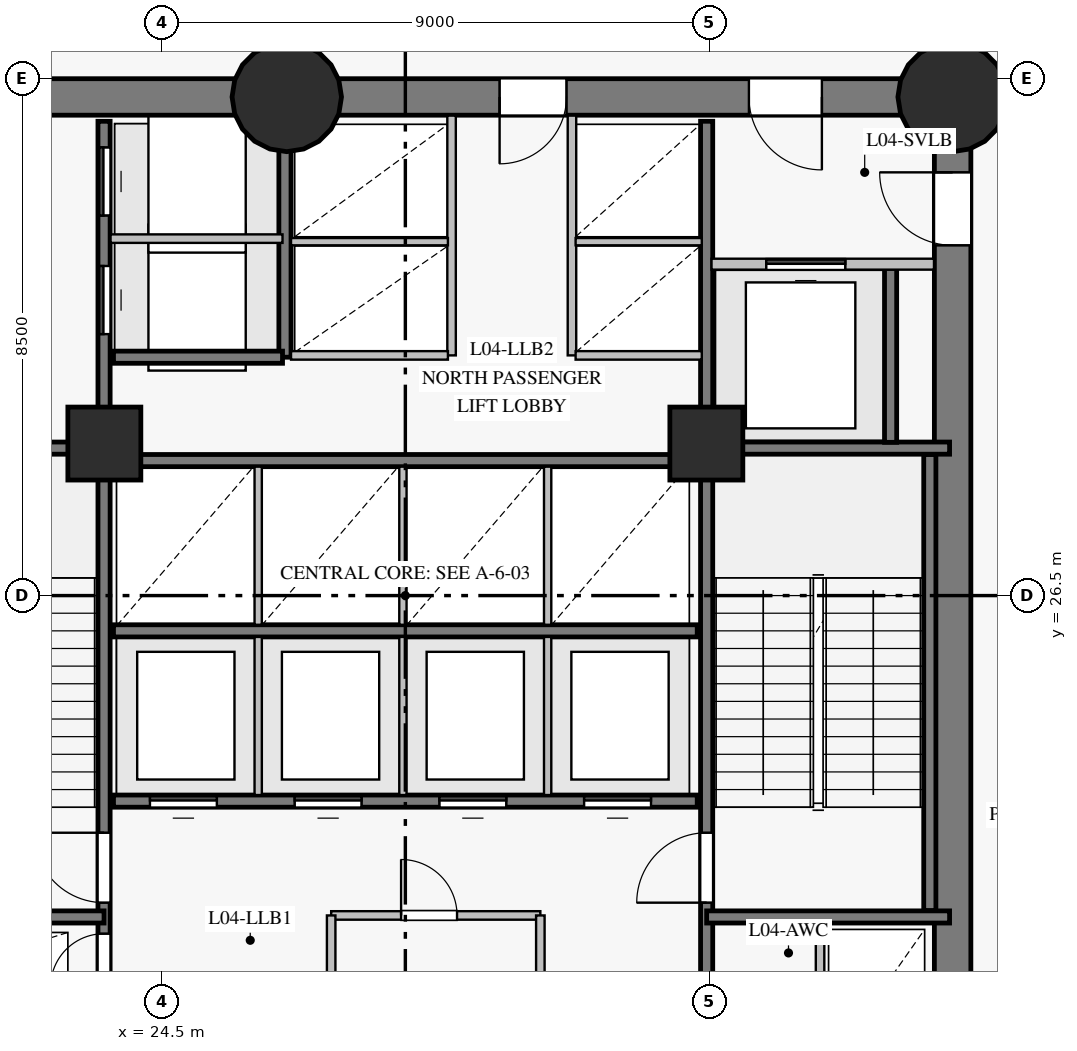
"""IFC4 building model, lengths in metres.
Left out: names, types, materials, properties, quantities, classifications, styles, units other than length and angle.
Written with IfcOpenShell. Run it as: python <this file> out.ifc"""

import sys

from ifc_helpers import new_model, si_unit, direction, frame, frame_2d, origin, origin_with_axes, origin_2d, place, context, subcontext, project, spatial, rectangle, circle, extrude, source, transform, mapped, element, fill, save


model = new_model("IFC4")
c1 = context("Model", 3, precision=1e-05, world=origin(), true_north=direction((0.0, 1.0)))
c2 = subcontext(c1, "Body", "Model", "MODEL_VIEW")
j1 = project(units=[si_unit("LENGTHUNIT", "METRE"), si_unit("PLANEANGLEUNIT", "RADIAN")], contexts=[c1])
p1 = place(None, origin())
s1 = spatial("IfcSite", under=j1, at=p1, CompositionType="ELEMENT")
p2 = place(p1, origin())
s2 = spatial("IfcBuilding", under=s1, at=p2, CompositionType="ELEMENT")
p3 = place(p2, frame((0.0, 0.0, 18.0)))
s3 = spatial("IfcBuildingStorey", under=s2, at=p3, CompositionType="ELEMENT", Elevation=18.0)
p4 = place(p3, frame((37.5, 18.3, 0.0), z_axis=(0.0, 0.0, 1.0), x_axis=(0.0, 1.0, 0.0)))
e1 = element("IfcWall", 1, at=p4, inside=s3, PredefinedType="SHEAR", context=c2, shape_type="SweptSolid", body=[
    extrude(rectangle(XDim=16.4, YDim=0.6, at=frame_2d((8.2, 0.0))), origin(), (0.0, 0.0, 1.0), 4.225),
])
p5 = place(p4, frame((13.96, 0.0, 0.0)))
e2 = element("IfcOpeningElement", 2, at=p5, cuts=e1, PredefinedType="OPENING", context=c2, shape_type="SweptSolid", body=[
    extrude(rectangle(XDim=1.2, YDim=2.15, at=frame_2d((0.6, 1.075))), frame((0.0, 0.31, 0.0), z_axis=(0.0, -1.0, 0.0), x_axis=(1.0, 0.0, 0.0)), (0.0, 0.0, 1.0), 0.62),
])
p6 = place(p3, frame((37.5, 34.7, 0.0), z_axis=(0.0, 0.0, 1.0), x_axis=(-1.0, 0.0, 0.0)))
e3 = element("IfcWall", 3, at=p6, inside=s3, PredefinedType="SHEAR", context=c2, shape_type="SweptSolid", body=[
    extrude(rectangle(XDim=10.95, YDim=0.6, at=frame_2d((5.475, 0.0))), origin(), (0.0, 0.0, 1.0), 4.225),
])
p7 = place(p6, frame((2.15, 0.0, 0.0)))
e4 = element("IfcOpeningElement", 4, at=p7, cuts=e3, PredefinedType="OPENING", context=c2, shape_type="SweptSolid", body=[
    extrude(rectangle(XDim=1.2, YDim=2.15, at=frame_2d((0.6, 1.075))), frame((0.0, 0.31, 0.0), z_axis=(0.0, -1.0, 0.0), x_axis=(1.0, 0.0, 0.0)), (0.0, 0.0, 1.0), 0.62),
])
p8 = place(p6, frame((6.35, 0.0, 0.0)))
e5 = element("IfcOpeningElement", 5, at=p8, cuts=e3, PredefinedType="OPENING", context=c2, shape_type="SweptSolid", body=[
    extrude(rectangle(XDim=1.1, YDim=2.15, at=frame_2d((0.55, 1.075))), frame((0.0, 0.31, 0.0), z_axis=(0.0, -1.0, 0.0), x_axis=(1.0, 0.0, 0.0)), (0.0, 0.0, 1.0), 0.62),
])
p9 = place(p3, frame((26.55, 34.7, 0.0), z_axis=(0.0, 0.0, 1.0), x_axis=(-1.0, 0.0, 0.0)))
e6 = element("IfcWall", 6, at=p9, inside=s3, PredefinedType="SHEAR", context=c2, shape_type="SweptSolid", body=[
    extrude(rectangle(XDim=7.05, YDim=0.6, at=frame_2d((3.525, 0.0))), origin(), (0.0, 0.0, 1.0), 4.225),
])
p10 = place(p9, frame((4.25, 0.0, 0.0)))
e7 = element("IfcOpeningElement", 7, at=p10, cuts=e6, PredefinedType="OPENING", context=c2, shape_type="SweptSolid", body=[
    extrude(rectangle(XDim=1.1, YDim=2.15, at=frame_2d((0.55, 1.075))), frame((0.0, 0.31, 0.0), z_axis=(0.0, -1.0, 0.0), x_axis=(1.0, 0.0, 0.0)), (0.0, 0.0, 1.0), 0.62),
])
m1 = source(origin_with_axes(), c2, "Body", "SweptSolid", [
    extrude(circle(Radius=0.9, at=origin_2d()), origin(), (0.0, 0.0, 1.0), 4.5),
])
for number, where, z_axis, x_axis in (
    (8, (26.55, 34.7, 0.0), (0.0, 0.0, 1.0), (1.0, 0.0, 0.0)),
    (9, (37.5, 34.7, 0.0), (0.0, 0.0, 1.0), (1.0, 0.0, 0.0)),
):
    element("IfcColumn", number, at=place(p3, frame(where, z_axis=z_axis, x_axis=x_axis)), inside=s3, PredefinedType="COLUMN", context=c2, shape_type="MappedRepresentation", body=[
        mapped(m1, transform((0.0, 0.0, 0.0), scale=1.0)),
    ])
m2 = source(origin_with_axes(), c2, "Body", "SweptSolid", [
    extrude(rectangle(XDim=1.2, YDim=1.2, at=origin_2d()), origin(), (0.0, 0.0, 1.0), 4.5),
])
for number, where, z_axis, x_axis in (
    (10, (23.55, 29.0, 0.0), (0.0, 0.0, 1.0), (1.0, 0.0, 0.0)),
    (11, (33.45, 29.0, 0.0), (0.0, 0.0, 1.0), (1.0, 0.0, 0.0)),
):
    element("IfcColumn", number, at=place(p3, frame(where, z_axis=z_axis, x_axis=x_axis)), inside=s3, PredefinedType="COLUMN", context=c2, shape_type="MappedRepresentation", body=[
        mapped(m2, transform((0.0, 0.0, 0.0), scale=1.0)),
    ])
p11 = place(p3, frame((23.545, 18.7, 0.0), z_axis=(0.0, 0.0, 1.0), x_axis=(0.0, 1.0, 0.0)))
e12 = element("IfcWall", 12, at=p11, inside=s3, PredefinedType="SHEAR", context=c2, shape_type="SweptSolid", body=[
    extrude(rectangle(XDim=15.6, YDim=0.2, at=frame_2d((7.8, 0.0))), origin(), (0.0, 0.0, 1.0), 4.225),
])
p12 = place(p11, frame((2.75, 0.0, 0.0)))
e13 = element("IfcOpeningElement", 13, at=p12, cuts=e12, PredefinedType="OPENING", context=c2, shape_type="SweptSolid", body=[
    extrude(rectangle(XDim=1.15, YDim=2.15, at=frame_2d((0.575, 1.075))), frame((0.0, 0.11, 0.0), z_axis=(0.0, -1.0, 0.0), x_axis=(1.0, 0.0, 0.0)), (0.0, 0.0, 1.0), 0.22),
])
p13 = place(p11, frame((0.14, 0.0, 0.0)))
e14 = element("IfcOpeningElement", 14, at=p13, cuts=e12, PredefinedType="OPENING", context=c2, shape_type="SweptSolid", body=[
    extrude(rectangle(XDim=0.88, YDim=2.1, at=frame_2d((0.44, 1.05))), frame((0.0, 0.11, 0.0), z_axis=(0.0, -1.0, 0.0), x_axis=(1.0, 0.0, 0.0)), (0.0, 0.0, 1.0), 0.22),
])
p14 = place(p11, frame((1.36, 0.0, 0.0)))
e15 = element("IfcOpeningElement", 15, at=p14, cuts=e12, PredefinedType="OPENING", context=c2, shape_type="SweptSolid", body=[
    extrude(rectangle(XDim=0.88, YDim=2.1, at=frame_2d((0.44, 1.05))), frame((0.0, 0.11, 0.0), z_axis=(0.0, -1.0, 0.0), x_axis=(1.0, 0.0, 0.0)), (0.0, 0.0, 1.0), 0.22),
])
p15 = place(p11, frame((12.1, 0.0, 0.0)))
e16 = element("IfcOpeningElement", 16, at=p15, cuts=e12, PredefinedType="OPENING", context=c2, shape_type="SweptSolid", body=[
    extrude(rectangle(XDim=1.12, YDim=2.15, at=frame_2d((0.56, 1.075))), frame((0.0, 0.11, 0.0), z_axis=(0.0, -1.0, 0.0), x_axis=(1.0, 0.0, 0.0)), (0.0, 0.0, 1.0), 0.22),
])
p16 = place(p11, frame((14.05, 0.0, 0.0)))
e17 = element("IfcOpeningElement", 17, at=p16, cuts=e12, PredefinedType="OPENING", context=c2, shape_type="SweptSolid", body=[
    extrude(rectangle(XDim=1.12, YDim=2.15, at=frame_2d((0.56, 1.075))), frame((0.0, 0.11, 0.0), z_axis=(0.0, -1.0, 0.0), x_axis=(1.0, 0.0, 0.0)), (0.0, 0.0, 1.0), 0.22),
])
p17 = place(p3, frame((33.455, 18.7, 0.0), z_axis=(0.0, 0.0, 1.0), x_axis=(0.0, 1.0, 0.0)))
e18 = element("IfcWall", 18, at=p17, inside=s3, PredefinedType="SHEAR", context=c2, shape_type="SweptSolid", body=[
    extrude(rectangle(XDim=15.6, YDim=0.2, at=frame_2d((7.8, 0.0))), origin(), (0.0, 0.0, 1.0), 4.225),
])
p18 = place(p17, frame((2.75, 0.0, 0.0)))
e19 = element("IfcOpeningElement", 19, at=p18, cuts=e18, PredefinedType="OPENING", context=c2, shape_type="SweptSolid", body=[
    extrude(rectangle(XDim=1.15, YDim=2.15, at=frame_2d((0.575, 1.075))), frame((0.0, 0.11, 0.0), z_axis=(0.0, -1.0, 0.0), x_axis=(1.0, 0.0, 0.0)), (0.0, 0.0, 1.0), 0.22),
])
p19 = place(p17, frame((0.55, 0.0, 0.0)))
e20 = element("IfcOpeningElement", 20, at=p19, cuts=e18, PredefinedType="OPENING", context=c2, shape_type="SweptSolid", body=[
    extrude(rectangle(XDim=0.94, YDim=2.1, at=frame_2d((0.47, 1.05))), frame((0.0, 0.11, 0.0), z_axis=(0.0, -1.0, 0.0), x_axis=(1.0, 0.0, 0.0)), (0.0, 0.0, 1.0), 0.22),
])
p20 = place(p3, frame((23.7, 23.12, 0.0), z_axis=(0.0, 0.0, 1.0), x_axis=(1.0, 0.0, 0.0)))
e21 = element("IfcWall", 21, at=p20, inside=s3, PredefinedType="SHEAR", context=c2, shape_type="SweptSolid", body=[
    extrude(rectangle(XDim=9.6, YDim=0.2, at=frame_2d((4.8, 0.0))), origin(), (0.0, 0.0, 1.0), 4.225),
])
p21 = place(p20, frame((0.6, 0.0, 0.0)))
e22 = element("IfcOpeningElement", 22, at=p21, cuts=e21, PredefinedType="OPENING", context=c2, shape_type="SweptSolid", body=[
    extrude(rectangle(XDim=1.1, YDim=2.15, at=frame_2d((0.55, 1.075))), frame((0.0, 0.11, 0.0), z_axis=(0.0, -1.0, 0.0), x_axis=(1.0, 0.0, 0.0)), (0.0, 0.0, 1.0), 0.22),
])
p22 = place(p20, frame((2.98, 0.0, 0.0)))
e23 = element("IfcOpeningElement", 23, at=p22, cuts=e21, PredefinedType="OPENING", context=c2, shape_type="SweptSolid", body=[
    extrude(rectangle(XDim=1.1, YDim=2.15, at=frame_2d((0.55, 1.075))), frame((0.0, 0.11, 0.0), z_axis=(0.0, -1.0, 0.0), x_axis=(1.0, 0.0, 0.0)), (0.0, 0.0, 1.0), 0.22),
])
p23 = place(p20, frame((5.36, 0.0, 0.0)))
e24 = element("IfcOpeningElement", 24, at=p23, cuts=e21, PredefinedType="OPENING", context=c2, shape_type="SweptSolid", body=[
    extrude(rectangle(XDim=1.1, YDim=2.15, at=frame_2d((0.55, 1.075))), frame((0.0, 0.11, 0.0), z_axis=(0.0, -1.0, 0.0), x_axis=(1.0, 0.0, 0.0)), (0.0, 0.0, 1.0), 0.22),
])
p24 = place(p20, frame((7.74, 0.0, 0.0)))
e25 = element("IfcOpeningElement", 25, at=p24, cuts=e21, PredefinedType="OPENING", context=c2, shape_type="SweptSolid", body=[
    extrude(rectangle(XDim=1.1, YDim=2.15, at=frame_2d((0.55, 1.075))), frame((0.0, 0.11, 0.0), z_axis=(0.0, -1.0, 0.0), x_axis=(1.0, 0.0, 0.0)), (0.0, 0.0, 1.0), 0.22),
])
for number, where, z_axis, x_axis in (
    (26, (23.7, 25.92, 0.0), (0.0, 0.0, 1.0), (1.0, 0.0, 0.0)),
    (27, (23.7, 28.72, 0.0), (0.0, 0.0, 1.0), (1.0, 0.0, 0.0)),
):
    element("IfcWall", number, at=place(p3, frame(where, z_axis=z_axis, x_axis=x_axis)), inside=s3, PredefinedType="SHEAR", context=c2, shape_type="SweptSolid", body=[
        extrude(rectangle(XDim=9.6, YDim=0.2, at=frame_2d((4.8, 0.0))), origin(), (0.0, 0.0, 1.0), 4.225),
    ])
p25 = place(p3, frame((37.125, 21.32, 0.0), z_axis=(0.0, 0.0, 1.0), x_axis=(0.0, 1.0, 0.0)))
e28 = element("IfcWall", 28, at=p25, inside=s3, PredefinedType="SHEAR", context=c2, shape_type="SweptSolid", body=[
    extrude(rectangle(XDim=7.5, YDim=0.2, at=frame_2d((3.75, 0.0))), origin(), (0.0, 0.0, 1.0), 4.225),
])
for number, where, z_axis, x_axis in (
    (29, (33.455, 21.215, 0.0), (0.0, 0.0, 1.0), (1.0, 0.0, 0.0)),
    (30, (33.455, 28.925, 0.0), (0.0, 0.0, 1.0), (1.0, 0.0, 0.0)),
    (31, (19.55, 21.215, 0.0), (0.0, 0.0, 1.0), (1.0, 0.0, 0.0)),
    (32, (19.55, 28.925, 0.0), (0.0, 0.0, 1.0), (1.0, 0.0, 0.0)),
):
    element("IfcWall", number, at=place(p3, frame(where, z_axis=z_axis, x_axis=x_axis)), inside=s3, PredefinedType="SHEAR", context=c2, shape_type="SweptSolid", body=[
        extrude(rectangle(XDim=3.995, YDim=0.2, at=frame_2d((1.998, 0.0))), origin(), (0.0, 0.0, 1.0), 4.225),
    ])
p26 = place(p3, frame((26.52, 30.42, 0.0), z_axis=(0.0, 0.0, 1.0), x_axis=(0.0, 1.0, 0.0)))
e33 = element("IfcWall", 33, at=p26, inside=s3, PredefinedType="SHEAR", context=c2, shape_type="SweptSolid", body=[
    extrude(rectangle(XDim=3.86, YDim=0.2, at=frame_2d((1.93, 0.0))), origin(), (0.0, 0.0, 1.0), 4.225),
])
p27 = place(p3, frame((36.48, 29.02, 0.0), z_axis=(0.0, 0.0, 1.0), x_axis=(0.0, 1.0, 0.0)))
e34 = element("IfcWall", 34, at=p27, inside=s3, PredefinedType="SHEAR", context=c2, shape_type="SweptSolid", body=[
    extrude(rectangle(XDim=2.86, YDim=0.2, at=frame_2d((1.43, 0.0))), origin(), (0.0, 0.0, 1.0), 4.225),
])
p28 = place(p3, frame((23.7, 30.42, 0.0), z_axis=(0.0, 0.0, 1.0), x_axis=(1.0, 0.0, 0.0)))
e35 = element("IfcWall", 35, at=p28, inside=s3, PredefinedType="SHEAR", context=c2, shape_type="SweptSolid", body=[
    extrude(rectangle(XDim=2.78, YDim=0.2, at=frame_2d((1.39, 0.0))), origin(), (0.0, 0.0, 1.0), 4.225),
])
for number, where, z_axis, x_axis in (
    (36, (29.26, 30.45, 0.0), (0.0, 0.0, 1.0), (0.0, 1.0, 0.0)),
    (37, (31.24, 30.45, 0.0), (0.0, 0.0, 1.0), (0.0, 1.0, 0.0)),
):
    element("IfcWall", number, at=place(p3, frame(where, z_axis=z_axis, x_axis=x_axis)), inside=s3, PredefinedType="PARTITIONING", context=c2, shape_type="SweptSolid", body=[
        extrude(rectangle(XDim=3.943, YDim=0.14, at=frame_2d((1.972, 0.0))), origin(), (0.0, 0.0, 1.0), 4.225),
    ])
p29 = place(p3, frame((33.535, 31.95, 0.0), z_axis=(0.0, 0.0, 1.0), x_axis=(1.0, 0.0, 0.0)))
e38 = element("IfcWall", 38, at=p29, inside=s3, PredefinedType="PARTITIONING", context=c2, shape_type="SweptSolid", body=[
    extrude(rectangle(XDim=3.658, YDim=0.18, at=frame_2d((1.829, 0.0))), origin(), (0.0, 0.0, 1.0), 4.225),
])
p30 = place(p29, frame((0.9, 0.0, 0.0)))
e39 = element("IfcOpeningElement", 39, at=p30, cuts=e38, PredefinedType="OPENING", context=c2, shape_type="SweptSolid", body=[
    extrude(rectangle(XDim=1.3, YDim=2.2, at=frame_2d((0.65, 1.1))), frame((0.0, 0.1, 0.0), z_axis=(0.0, -1.0, 0.0), x_axis=(1.0, 0.0, 0.0)), (0.0, 0.0, 1.0), 0.2),
])
p31 = place(p3, frame((27.28, 21.24, 0.0), z_axis=(0.0, 0.0, 1.0), x_axis=(1.0, 0.0, 0.0)))
e40 = element("IfcWall", 40, at=p31, inside=s3, PredefinedType="PARTITIONING", context=c2, shape_type="SweptSolid", body=[
    extrude(rectangle(XDim=3.44, YDim=0.14, at=frame_2d((1.72, 0.0))), origin(), (0.0, 0.0, 1.0), 4.225),
])
p32 = place(p31, frame((1.15, 0.0, 0.0)))
e41 = element("IfcOpeningElement", 41, at=p32, cuts=e40, PredefinedType="OPENING", context=c2, shape_type="SweptSolid", body=[
    extrude(rectangle(XDim=0.92, YDim=2.1, at=frame_2d((0.46, 1.05))), frame((0.0, 0.08, 0.0), z_axis=(0.0, -1.0, 0.0), x_axis=(1.0, 0.0, 0.0)), (0.0, 0.0, 1.0), 0.16),
])
p33 = place(p3, frame((23.652, 32.37, 0.0), z_axis=(0.0, 0.0, 1.0), x_axis=(1.0, 0.0, 0.0)))
e42 = element("IfcWall", 42, at=p33, inside=s3, PredefinedType="PARTITIONING", context=c2, shape_type="SweptSolid", body=[
    extrude(rectangle(XDim=2.828, YDim=0.14, at=frame_2d((1.414, 0.0))), origin(), (0.0, 0.0, 1.0), 4.225),
])
for number, where, z_axis, x_axis in (
    (43, (27.28, 18.55, 0.0), (0.0, 0.0, 1.0), (0.0, 1.0, 0.0)),
    (44, (30.72, 18.55, 0.0), (0.0, 0.0, 1.0), (0.0, 1.0, 0.0)),
):
    element("IfcWall", number, at=place(p3, frame(where, z_axis=z_axis, x_axis=x_axis)), inside=s3, PredefinedType="PARTITIONING", context=c2, shape_type="SweptSolid", body=[
        extrude(rectangle(XDim=2.69, YDim=0.14, at=frame_2d((1.345, 0.0))), origin(), (0.0, 0.0, 1.0), 4.225),
    ])
for number, where, z_axis, x_axis in (
    (45, (26.08, 23.22, 0.0), (0.0, 0.0, 1.0), (0.0, 1.0, 0.0)),
    (46, (28.46, 23.22, 0.0), (0.0, 0.0, 1.0), (0.0, 1.0, 0.0)),
    (47, (30.84, 23.22, 0.0), (0.0, 0.0, 1.0), (0.0, 1.0, 0.0)),
    (48, (26.08, 26.02, 0.0), (0.0, 0.0, 1.0), (0.0, 1.0, 0.0)),
    (49, (28.46, 26.02, 0.0), (0.0, 0.0, 1.0), (0.0, 1.0, 0.0)),
    (50, (30.84, 26.02, 0.0), (0.0, 0.0, 1.0), (0.0, 1.0, 0.0)),
):
    element("IfcWall", number, at=place(p3, frame(where, z_axis=z_axis, x_axis=x_axis)), inside=s3, PredefinedType="PARTITIONING", context=c2, shape_type="SweptSolid", body=[
        extrude(rectangle(XDim=2.6, YDim=0.12, at=frame_2d((1.3, 0.0))), origin(), (0.0, 0.0, 1.0), 4.225),
    ])
p34 = place(p3, frame((26.62, 30.45, 0.0), z_axis=(0.0, 0.0, 1.0), x_axis=(1.0, 0.0, 0.0)))
e51 = element("IfcWall", 51, at=p34, inside=s3, PredefinedType="PARTITIONING", context=c2, shape_type="SweptSolid", body=[
    extrude(rectangle(XDim=2.58, YDim=0.14, at=frame_2d((1.29, 0.0))), origin(), (0.0, 0.0, 1.0), 4.225),
])
p35 = place(p3, frame((26.62, 32.32, 0.0), z_axis=(0.0, 0.0, 1.0), x_axis=(1.0, 0.0, 0.0)))
e52 = element("IfcWall", 52, at=p35, inside=s3, PredefinedType="PARTITIONING", context=c2, shape_type="SweptSolid", body=[
    extrude(rectangle(XDim=2.58, YDim=0.12, at=frame_2d((1.29, 0.0))), origin(), (0.0, 0.0, 1.0), 4.225),
])
p36 = place(p3, frame((35.32, 18.607, 0.0), z_axis=(0.0, 0.0, 1.0), x_axis=(0.0, 1.0, 0.0)))
e53 = element("IfcWall", 53, at=p36, inside=s3, PredefinedType="PARTITIONING", context=c2, shape_type="SweptSolid", body=[
    extrude(rectangle(XDim=2.503, YDim=0.14, at=frame_2d((1.251, 0.0))), origin(), (0.0, 0.0, 1.0), 4.225),
])
p37 = place(p3, frame((31.3, 30.45, 0.0), z_axis=(0.0, 0.0, 1.0), x_axis=(1.0, 0.0, 0.0)))
e54 = element("IfcWall", 54, at=p37, inside=s3, PredefinedType="PARTITIONING", context=c2, shape_type="SweptSolid", body=[
    extrude(rectangle(XDim=2.075, YDim=0.14, at=frame_2d((1.038, 0.0))), origin(), (0.0, 0.0, 1.0), 4.225),
])
p38 = place(p3, frame((31.3, 32.32, 0.0), z_axis=(0.0, 0.0, 1.0), x_axis=(1.0, 0.0, 0.0)))
e55 = element("IfcWall", 55, at=p38, inside=s3, PredefinedType="PARTITIONING", context=c2, shape_type="SweptSolid", body=[
    extrude(rectangle(XDim=2.075, YDim=0.12, at=frame_2d((1.038, 0.0))), origin(), (0.0, 0.0, 1.0), 4.225),
])
m3 = source(origin_with_axes(), c2, "Body", "SweptSolid", [
    extrude(rectangle(XDim=1.15, YDim=2.15, at=frame_2d((0.575, 1.075))), frame((0.0, 0.025, 0.0), z_axis=(0.0, -1.0, 0.0), x_axis=(1.0, 0.0, 0.0)), (0.0, 0.0, 1.0), 0.05),
])
p39 = place(p12, origin())
e56 = element("IfcDoor", 56, at=p39, inside=s3, OperationType="SINGLE_SWING_RIGHT", PredefinedType="DOOR", context=c2, shape_type="MappedRepresentation", body=[
    mapped(m3, transform((0.0, 0.0, 0.0), scale=1.0)),
])
fill(e13, e56)
p40 = place(p18, origin())
e57 = element("IfcDoor", 57, at=p40, inside=s3, OperationType="SINGLE_SWING_LEFT", PredefinedType="DOOR", context=c2, shape_type="MappedRepresentation", body=[
    mapped(m3, transform((0.0, 0.0, 0.0), scale=1.0)),
])
fill(e19, e57)
m4 = source(origin_with_axes(), c2, "Body", "SweptSolid", [
    extrude(rectangle(XDim=1.2, YDim=2.15, at=frame_2d((0.6, 1.075))), frame((0.0, 0.025, 0.0), z_axis=(0.0, -1.0, 0.0), x_axis=(1.0, 0.0, 0.0)), (0.0, 0.0, 1.0), 0.05),
])
p41 = place(p5, origin())
e58 = element("IfcDoor", 58, at=p41, inside=s3, OperationType="SINGLE_SWING_RIGHT", PredefinedType="DOOR", context=c2, shape_type="MappedRepresentation", body=[
    mapped(m4, transform((0.0, 0.0, 0.0), scale=1.0)),
])
fill(e2, e58)
p42 = place(p7, origin())
e59 = element("IfcDoor", 59, at=p42, inside=s3, OperationType="SINGLE_SWING_LEFT", PredefinedType="DOOR", context=c2, shape_type="MappedRepresentation", body=[
    mapped(m4, transform((0.0, 0.0, 0.0), scale=1.0)),
])
fill(e4, e59)
m5 = source(origin_with_axes(), c2, "Body", "SweptSolid", [
    extrude(rectangle(XDim=1.3, YDim=2.2, at=frame_2d((0.65, 1.1))), frame((0.0, 0.025, 0.0), z_axis=(0.0, -1.0, 0.0), x_axis=(1.0, 0.0, 0.0)), (0.0, 0.0, 1.0), 0.05),
])
p43 = place(p30, origin())
e60 = element("IfcDoor", 60, at=p43, inside=s3, OperationType="SLIDING_TO_LEFT", PredefinedType="DOOR", context=c2, shape_type="MappedRepresentation", body=[
    mapped(m5, transform((0.0, 0.0, 0.0), scale=1.0)),
])
fill(e39, e60)
m6 = source(origin_with_axes(), c2, "Body", "SweptSolid", [
    extrude(rectangle(XDim=0.88, YDim=2.1, at=frame_2d((0.44, 1.05))), frame((0.0, 0.025, 0.0), z_axis=(0.0, -1.0, 0.0), x_axis=(1.0, 0.0, 0.0)), (0.0, 0.0, 1.0), 0.05),
])
p44 = place(p14, origin())
e61 = element("IfcDoor", 61, at=p44, inside=s3, OperationType="SINGLE_SWING_LEFT", PredefinedType="DOOR", context=c2, shape_type="MappedRepresentation", body=[
    mapped(m6, transform((0.0, 0.0, 0.0), scale=1.0)),
])
fill(e15, e61)
m7 = source(origin_with_axes(), c2, "Body", "SweptSolid", [
    extrude(rectangle(XDim=0.92, YDim=2.1, at=frame_2d((0.46, 1.05))), frame((0.0, 0.025, 0.0), z_axis=(0.0, -1.0, 0.0), x_axis=(1.0, 0.0, 0.0)), (0.0, 0.0, 1.0), 0.05),
])
p45 = place(p32, origin())
e62 = element("IfcDoor", 62, at=p45, inside=s3, OperationType="SINGLE_SWING_LEFT", PredefinedType="DOOR", context=c2, shape_type="MappedRepresentation", body=[
    mapped(m7, transform((0.0, 0.0, 0.0), scale=1.0)),
])
fill(e41, e62)
m8 = source(origin_with_axes(), c2, "Body", "SweptSolid", [
    extrude(rectangle(XDim=1.1, YDim=2.15, at=frame_2d((0.55, 1.075))), frame((0.0, 0.025, 0.0), z_axis=(0.0, -1.0, 0.0), x_axis=(1.0, 0.0, 0.0)), (0.0, 0.0, 1.0), 0.05),
])
p46 = place(p21, origin())
e63 = element("IfcDoor", 63, at=p46, inside=s3, OperationType="SLIDING_TO_LEFT", PredefinedType="DOOR", context=c2, shape_type="MappedRepresentation", body=[
    mapped(m8, transform((0.0, 0.0, 0.0), scale=1.0)),
])
fill(e22, e63)
p47 = place(p22, origin())
e64 = element("IfcDoor", 64, at=p47, inside=s3, OperationType="SLIDING_TO_RIGHT", PredefinedType="DOOR", context=c2, shape_type="MappedRepresentation", body=[
    mapped(m8, transform((0.0, 0.0, 0.0), scale=1.0)),
])
fill(e23, e64)
p48 = place(p23, origin())
e65 = element("IfcDoor", 65, at=p48, inside=s3, OperationType="SLIDING_TO_LEFT", PredefinedType="DOOR", context=c2, shape_type="MappedRepresentation", body=[
    mapped(m8, transform((0.0, 0.0, 0.0), scale=1.0)),
])
fill(e24, e65)
p49 = place(p24, origin())
e66 = element("IfcDoor", 66, at=p49, inside=s3, OperationType="SLIDING_TO_RIGHT", PredefinedType="DOOR", context=c2, shape_type="MappedRepresentation", body=[
    mapped(m8, transform((0.0, 0.0, 0.0), scale=1.0)),
])
fill(e25, e66)
p50 = place(p8, origin())
e67 = element("IfcDoor", 67, at=p50, inside=s3, OperationType="SINGLE_SWING_RIGHT", PredefinedType="DOOR", context=c2, shape_type="MappedRepresentation", body=[
    mapped(m8, transform((0.0, 0.0, 0.0), scale=1.0)),
])
fill(e5, e67)
m9 = source(origin_with_axes(), c2, "Body", "SweptSolid", [
    extrude(rectangle(XDim=1.12, YDim=2.15, at=frame_2d((0.56, 1.075))), frame((0.0, 0.025, 0.0), z_axis=(0.0, -1.0, 0.0), x_axis=(1.0, 0.0, 0.0)), (0.0, 0.0, 1.0), 0.05),
])
p51 = place(p15, origin())
e68 = element("IfcDoor", 68, at=p51, inside=s3, OperationType="SLIDING_TO_LEFT", PredefinedType="DOOR", context=c2, shape_type="MappedRepresentation", body=[
    mapped(m9, transform((0.0, 0.0, 0.0), scale=1.0)),
])
fill(e16, e68)
p52 = place(p16, origin())
e69 = element("IfcDoor", 69, at=p52, inside=s3, OperationType="SLIDING_TO_RIGHT", PredefinedType="DOOR", context=c2, shape_type="MappedRepresentation", body=[
    mapped(m9, transform((0.0, 0.0, 0.0), scale=1.0)),
])
fill(e17, e69)
save(model, sys.argv[1])
